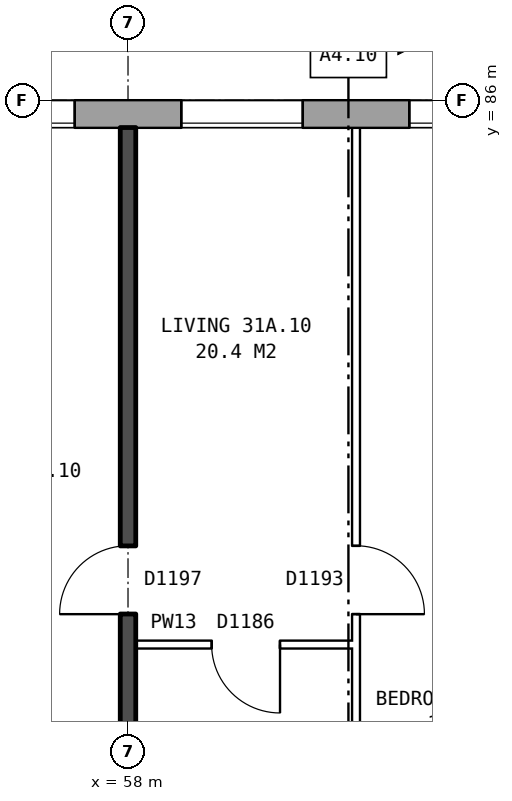
"""IFC4 building model, lengths in metres.
Left out: names, types, materials, properties, quantities, classifications, styles, units other than length and angle.
Written with IfcOpenShell. Run it as: python <this file> out.ifc"""

import sys

from ifc_helpers import new_model, si_unit, direction, frame, frame_2d, origin, place, context, subcontext, project, spatial, rectangle, extrude, element, fill, save


model = new_model("IFC4")
c1 = context("Model", 3, precision=1e-05, world=origin(), true_north=direction((0.0, 1.0)))
c2 = subcontext(c1, "Body", "Model", "MODEL_VIEW")
j1 = project(units=[si_unit("LENGTHUNIT", "METRE"), si_unit("PLANEANGLEUNIT", "RADIAN")], contexts=[c1])
p1 = place(None, origin())
s1 = spatial("IfcSite", under=j1, at=p1, CompositionType="ELEMENT")
p2 = place(p1, origin())
s2 = spatial("IfcBuilding", under=s1, at=p2, CompositionType="ELEMENT")
p3 = place(p2, frame((0.0, 0.0, 111.9)))
s3 = spatial("IfcBuildingStorey", under=s2, at=p3, CompositionType="ELEMENT", Elevation=111.9)
p4 = place(p3, frame((72.925, 85.82, 0.0), z_axis=(0.0, 0.0, 1.0), x_axis=(-1.0, 0.0, 0.0)))
e1 = element("IfcWall", 1, at=p4, inside=s3, PredefinedType="STANDARD", context=c2, shape_type="SweptSolid", body=[
    extrude(rectangle(XDim=44.851, YDim=0.36, at=frame_2d((22.425, 0.0))), origin(), (0.0, 0.0, 1.0), 2.85),
])
p5 = place(p4, frame((0.625, 0.0, 0.8)))
e2 = element("IfcOpeningElement", 2, at=p5, cuts=e1, PredefinedType="OPENING", context=c2, shape_type="SweptSolid", body=[
    extrude(rectangle(XDim=1.6, YDim=1.8, at=frame_2d((0.8, 0.9))), frame((0.0, 0.19, 0.0), z_axis=(0.0, -1.0, 0.0), x_axis=(1.0, 0.0, 0.0)), (0.0, 0.0, 1.0), 0.38),
])
p6 = place(p4, frame((3.625, 0.0, 0.8)))
e3 = element("IfcOpeningElement", 3, at=p6, cuts=e1, PredefinedType="OPENING", context=c2, shape_type="SweptSolid", body=[
    extrude(rectangle(XDim=1.6, YDim=1.8, at=frame_2d((0.8, 0.9))), frame((0.0, 0.19, 0.0), z_axis=(0.0, -1.0, 0.0), x_axis=(1.0, 0.0, 0.0)), (0.0, 0.0, 1.0), 0.38),
])
p7 = place(p4, frame((6.625, 0.0, 0.8)))
e4 = element("IfcOpeningElement", 4, at=p7, cuts=e1, PredefinedType="OPENING", context=c2, shape_type="SweptSolid", body=[
    extrude(rectangle(XDim=1.6, YDim=1.8, at=frame_2d((0.8, 0.9))), frame((0.0, 0.19, 0.0), z_axis=(0.0, -1.0, 0.0), x_axis=(1.0, 0.0, 0.0)), (0.0, 0.0, 1.0), 0.38),
])
p8 = place(p4, frame((9.625, 0.0, 0.8)))
e5 = element("IfcOpeningElement", 5, at=p8, cuts=e1, PredefinedType="OPENING", context=c2, shape_type="SweptSolid", body=[
    extrude(rectangle(XDim=1.6, YDim=1.8, at=frame_2d((0.8, 0.9))), frame((0.0, 0.19, 0.0), z_axis=(0.0, -1.0, 0.0), x_axis=(1.0, 0.0, 0.0)), (0.0, 0.0, 1.0), 0.38),
])
p9 = place(p4, frame((12.625, 0.0, 0.8)))
e6 = element("IfcOpeningElement", 6, at=p9, cuts=e1, PredefinedType="OPENING", context=c2, shape_type="SweptSolid", body=[
    extrude(rectangle(XDim=1.6, YDim=1.8, at=frame_2d((0.8, 0.9))), frame((0.0, 0.19, 0.0), z_axis=(0.0, -1.0, 0.0), x_axis=(1.0, 0.0, 0.0)), (0.0, 0.0, 1.0), 0.38),
])
p10 = place(p4, frame((15.625, 0.0, 0.8)))
e7 = element("IfcOpeningElement", 7, at=p10, cuts=e1, PredefinedType="OPENING", context=c2, shape_type="SweptSolid", body=[
    extrude(rectangle(XDim=1.6, YDim=1.8, at=frame_2d((0.8, 0.9))), frame((0.0, 0.19, 0.0), z_axis=(0.0, -1.0, 0.0), x_axis=(1.0, 0.0, 0.0)), (0.0, 0.0, 1.0), 0.38),
])
p11 = place(p4, frame((18.125, 0.0, 0.8)))
e8 = element("IfcOpeningElement", 8, at=p11, cuts=e1, PredefinedType="OPENING", context=c2, shape_type="SweptSolid", body=[
    extrude(rectangle(XDim=1.0, YDim=1.8, at=frame_2d((0.5, 0.9))), frame((0.0, 0.19, 0.0), z_axis=(0.0, -1.0, 0.0), x_axis=(1.0, 0.0, 0.0)), (0.0, 0.0, 1.0), 0.38),
])
p12 = place(p4, frame((21.725, 0.0, 0.55)))
e9 = element("IfcOpeningElement", 9, at=p12, cuts=e1, PredefinedType="OPENING", context=c2, shape_type="SweptSolid", body=[
    extrude(rectangle(XDim=1.4, YDim=1.2, at=frame_2d((0.7, 0.6))), frame((0.0, 0.19, 0.0), z_axis=(0.0, -1.0, 0.0), x_axis=(1.0, 0.0, 0.0)), (0.0, 0.0, 1.0), 0.38),
])
p13 = place(p4, frame((24.425, 0.0, 1.7)))
e10 = element("IfcOpeningElement", 10, at=p13, cuts=e1, PredefinedType="OPENING", context=c2, shape_type="SweptSolid", body=[
    extrude(rectangle(XDim=1.0, YDim=0.9, at=frame_2d((0.5, 0.45))), frame((0.0, 0.19, 0.0), z_axis=(0.0, -1.0, 0.0), x_axis=(1.0, 0.0, 0.0)), (0.0, 0.0, 1.0), 0.38),
])
p14 = place(p4, frame((27.625, 0.0, 0.8)))
e11 = element("IfcOpeningElement", 11, at=p14, cuts=e1, PredefinedType="OPENING", context=c2, shape_type="SweptSolid", body=[
    extrude(rectangle(XDim=1.6, YDim=1.8, at=frame_2d((0.8, 0.9))), frame((0.0, 0.19, 0.0), z_axis=(0.0, -1.0, 0.0), x_axis=(1.0, 0.0, 0.0)), (0.0, 0.0, 1.0), 0.38),
])
p15 = place(p4, frame((30.625, 0.0, 0.8)))
e12 = element("IfcOpeningElement", 12, at=p15, cuts=e1, PredefinedType="OPENING", context=c2, shape_type="SweptSolid", body=[
    extrude(rectangle(XDim=1.6, YDim=1.8, at=frame_2d((0.8, 0.9))), frame((0.0, 0.19, 0.0), z_axis=(0.0, -1.0, 0.0), x_axis=(1.0, 0.0, 0.0)), (0.0, 0.0, 1.0), 0.38),
])
p16 = place(p4, frame((33.625, 0.0, 0.8)))
e13 = element("IfcOpeningElement", 13, at=p16, cuts=e1, PredefinedType="OPENING", context=c2, shape_type="SweptSolid", body=[
    extrude(rectangle(XDim=1.6, YDim=1.8, at=frame_2d((0.8, 0.9))), frame((0.0, 0.19, 0.0), z_axis=(0.0, -1.0, 0.0), x_axis=(1.0, 0.0, 0.0)), (0.0, 0.0, 1.0), 0.38),
])
p17 = place(p4, frame((36.625, 0.0, 0.8)))
e14 = element("IfcOpeningElement", 14, at=p17, cuts=e1, PredefinedType="OPENING", context=c2, shape_type="SweptSolid", body=[
    extrude(rectangle(XDim=1.6, YDim=1.8, at=frame_2d((0.8, 0.9))), frame((0.0, 0.19, 0.0), z_axis=(0.0, -1.0, 0.0), x_axis=(1.0, 0.0, 0.0)), (0.0, 0.0, 1.0), 0.38),
])
p18 = place(p4, frame((39.625, 0.0, 0.8)))
e15 = element("IfcOpeningElement", 15, at=p18, cuts=e1, PredefinedType="OPENING", context=c2, shape_type="SweptSolid", body=[
    extrude(rectangle(XDim=1.6, YDim=1.8, at=frame_2d((0.8, 0.9))), frame((0.0, 0.19, 0.0), z_axis=(0.0, -1.0, 0.0), x_axis=(1.0, 0.0, 0.0)), (0.0, 0.0, 1.0), 0.38),
])
p19 = place(p4, frame((42.625, 0.0, 0.8)))
e16 = element("IfcOpeningElement", 16, at=p19, cuts=e1, PredefinedType="OPENING", context=c2, shape_type="SweptSolid", body=[
    extrude(rectangle(XDim=1.6, YDim=1.8, at=frame_2d((0.8, 0.9))), frame((0.0, 0.19, 0.0), z_axis=(0.0, -1.0, 0.0), x_axis=(1.0, 0.0, 0.0)), (0.0, 0.0, 1.0), 0.38),
])
p20 = place(p4, frame((19.425, 0.0, 1.7)))
e17 = element("IfcOpeningElement", 17, at=p20, cuts=e1, PredefinedType="OPENING", context=c2, shape_type="SweptSolid", body=[
    extrude(rectangle(XDim=1.0, YDim=0.9, at=frame_2d((0.5, 0.45))), frame((0.0, 0.19, 0.0), z_axis=(0.0, -1.0, 0.0), x_axis=(1.0, 0.0, 0.0)), (0.0, 0.0, 1.0), 0.38),
])
p21 = place(p4, frame((25.725, 0.0, 0.8)))
e18 = element("IfcOpeningElement", 18, at=p21, cuts=e1, PredefinedType="OPENING", context=c2, shape_type="SweptSolid", body=[
    extrude(rectangle(XDim=1.0, YDim=1.8, at=frame_2d((0.5, 0.9))), frame((0.0, 0.19, 0.0), z_axis=(0.0, -1.0, 0.0), x_axis=(1.0, 0.0, 0.0)), (0.0, 0.0, 1.0), 0.38),
])
p22 = place(p3, frame((58.1, 78.84, 0.0), z_axis=(0.0, 0.0, 1.0), x_axis=(1.0, 0.0, 0.0)))
e19 = element("IfcWall", 19, at=p22, inside=s3, PredefinedType="PARTITIONING", context=c2, shape_type="SweptSolid", body=[
    extrude(rectangle(XDim=2.9, YDim=0.1, at=frame_2d((1.45, 0.0))), origin(), (0.0, 0.0, 1.0), 2.85),
])
p23 = place(p22, frame((1.0, 0.0, 0.0)))
e20 = element("IfcOpeningElement", 20, at=p23, cuts=e19, PredefinedType="OPENING", context=c2, shape_type="SweptSolid", body=[
    extrude(rectangle(XDim=0.9, YDim=2.1, at=frame_2d((0.45, 1.05))), frame((0.0, 0.06, 0.0), z_axis=(0.0, -1.0, 0.0), x_axis=(1.0, 0.0, 0.0)), (0.0, 0.0, 1.0), 0.12),
])
p24 = place(p3, frame((58.0, 71.2, 0.0), z_axis=(0.0, 0.0, 1.0), x_axis=(0.0, 1.0, 0.0)))
e21 = element("IfcWall", 21, at=p24, inside=s3, PredefinedType="SOLIDWALL", context=c2, shape_type="SweptSolid", body=[
    extrude(rectangle(XDim=14.44, YDim=0.2, at=frame_2d((7.22, 0.0))), origin(), (0.0, 0.0, 1.0), 2.85),
])
p25 = place(p24, frame((8.04, 0.0, 0.0)))
e22 = element("IfcOpeningElement", 22, at=p25, cuts=e21, PredefinedType="OPENING", context=c2, shape_type="SweptSolid", body=[
    extrude(rectangle(XDim=0.9, YDim=2.1, at=frame_2d((0.45, 1.05))), frame((0.0, 0.11, 0.0), z_axis=(0.0, -1.0, 0.0), x_axis=(1.0, 0.0, 0.0)), (0.0, 0.0, 1.0), 0.22),
])
p26 = place(p24, frame((0.4, 0.0, 0.0)))
e23 = element("IfcOpeningElement", 23, at=p26, cuts=e21, PredefinedType="OPENING", context=c2, shape_type="SweptSolid", body=[
    extrude(rectangle(XDim=0.9, YDim=2.1, at=frame_2d((0.45, 1.05))), frame((0.0, 0.11, 0.0), z_axis=(0.0, -1.0, 0.0), x_axis=(1.0, 0.0, 0.0)), (0.0, 0.0, 1.0), 0.22),
])
p27 = place(p3, frame((61.0, 71.3, 0.0), z_axis=(0.0, 0.0, 1.0), x_axis=(0.0, 1.0, 0.0)))
e24 = element("IfcWall", 24, at=p27, inside=s3, PredefinedType="PARTITIONING", context=c2, shape_type="SweptSolid", body=[
    extrude(rectangle(XDim=14.34, YDim=0.1, at=frame_2d((7.17, 0.0))), origin(), (0.0, 0.0, 1.0), 2.85),
])
p28 = place(p27, frame((7.94, 0.0, 0.0)))
e25 = element("IfcOpeningElement", 25, at=p28, cuts=e24, PredefinedType="OPENING", context=c2, shape_type="SweptSolid", body=[
    extrude(rectangle(XDim=0.9, YDim=2.1, at=frame_2d((0.45, 1.05))), frame((0.0, 0.06, 0.0), z_axis=(0.0, -1.0, 0.0), x_axis=(1.0, 0.0, 0.0)), (0.0, 0.0, 1.0), 0.12),
])
p29 = place(p27, frame((0.4, 0.0, 0.0)))
e26 = element("IfcOpeningElement", 26, at=p29, cuts=e24, PredefinedType="OPENING", context=c2, shape_type="SweptSolid", body=[
    extrude(rectangle(XDim=0.9, YDim=2.1, at=frame_2d((0.45, 1.05))), frame((0.0, 0.06, 0.0), z_axis=(0.0, -1.0, 0.0), x_axis=(1.0, 0.0, 0.0)), (0.0, 0.0, 1.0), 0.12),
])
p30 = place(p8, origin())
e27 = element("IfcWindow", 27, at=p30, inside=s3, PartitioningType="SINGLE_PANEL", PredefinedType="WINDOW", context=c2, shape_type="SweptSolid", body=[
    extrude(rectangle(XDim=1.6, YDim=1.8, at=frame_2d((0.8, 0.9))), frame((0.0, 0.15, 0.0), z_axis=(0.0, -1.0, 0.0), x_axis=(1.0, 0.0, 0.0)), (0.0, 0.0, 1.0), 0.06),
])
fill(e5, e27)
p31 = place(p9, origin())
e28 = element("IfcWindow", 28, at=p31, inside=s3, PartitioningType="SINGLE_PANEL", PredefinedType="WINDOW", context=c2, shape_type="SweptSolid", body=[
    extrude(rectangle(XDim=1.6, YDim=1.8, at=frame_2d((0.8, 0.9))), frame((0.0, 0.15, 0.0), z_axis=(0.0, -1.0, 0.0), x_axis=(1.0, 0.0, 0.0)), (0.0, 0.0, 1.0), 0.06),
])
fill(e6, e28)
p32 = place(p10, origin())
e29 = element("IfcWindow", 29, at=p32, inside=s3, PartitioningType="SINGLE_PANEL", PredefinedType="WINDOW", context=c2, shape_type="SweptSolid", body=[
    extrude(rectangle(XDim=1.6, YDim=1.8, at=frame_2d((0.8, 0.9))), frame((0.0, 0.15, 0.0), z_axis=(0.0, -1.0, 0.0), x_axis=(1.0, 0.0, 0.0)), (0.0, 0.0, 1.0), 0.06),
])
fill(e7, e29)
p33 = place(p28, frame((0.9, 0.0, 0.0), z_axis=(0.0, 0.0, 1.0), x_axis=(-1.0, 0.0, 0.0)))
e30 = element("IfcDoor", 30, at=p33, inside=s3, OperationType="SINGLE_SWING_RIGHT", PredefinedType="DOOR", context=c2, shape_type="SweptSolid", body=[
    extrude(rectangle(XDim=0.9, YDim=2.1, at=frame_2d((0.45, 1.05))), frame((0.0, 0.025, 0.0), z_axis=(0.0, -1.0, 0.0), x_axis=(1.0, 0.0, 0.0)), (0.0, 0.0, 1.0), 0.05),
])
fill(e25, e30)
p34 = place(p25, origin())
e31 = element("IfcDoor", 31, at=p34, inside=s3, OperationType="SINGLE_SWING_LEFT", PredefinedType="DOOR", context=c2, shape_type="SweptSolid", body=[
    extrude(rectangle(XDim=0.9, YDim=2.1, at=frame_2d((0.45, 1.05))), frame((0.0, 0.025, 0.0), z_axis=(0.0, -1.0, 0.0), x_axis=(1.0, 0.0, 0.0)), (0.0, 0.0, 1.0), 0.05),
])
fill(e22, e31)
p35 = place(p23, frame((0.9, 0.0, 0.0), z_axis=(0.0, 0.0, 1.0), x_axis=(-1.0, 0.0, 0.0)))
e32 = element("IfcDoor", 32, at=p35, inside=s3, OperationType="SINGLE_SWING_LEFT", PredefinedType="DOOR", context=c2, shape_type="SweptSolid", body=[
    extrude(rectangle(XDim=0.9, YDim=2.1, at=frame_2d((0.45, 1.05))), frame((0.0, 0.025, 0.0), z_axis=(0.0, -1.0, 0.0), x_axis=(1.0, 0.0, 0.0)), (0.0, 0.0, 1.0), 0.05),
])
fill(e20, e32)
save(model, sys.argv[1])
